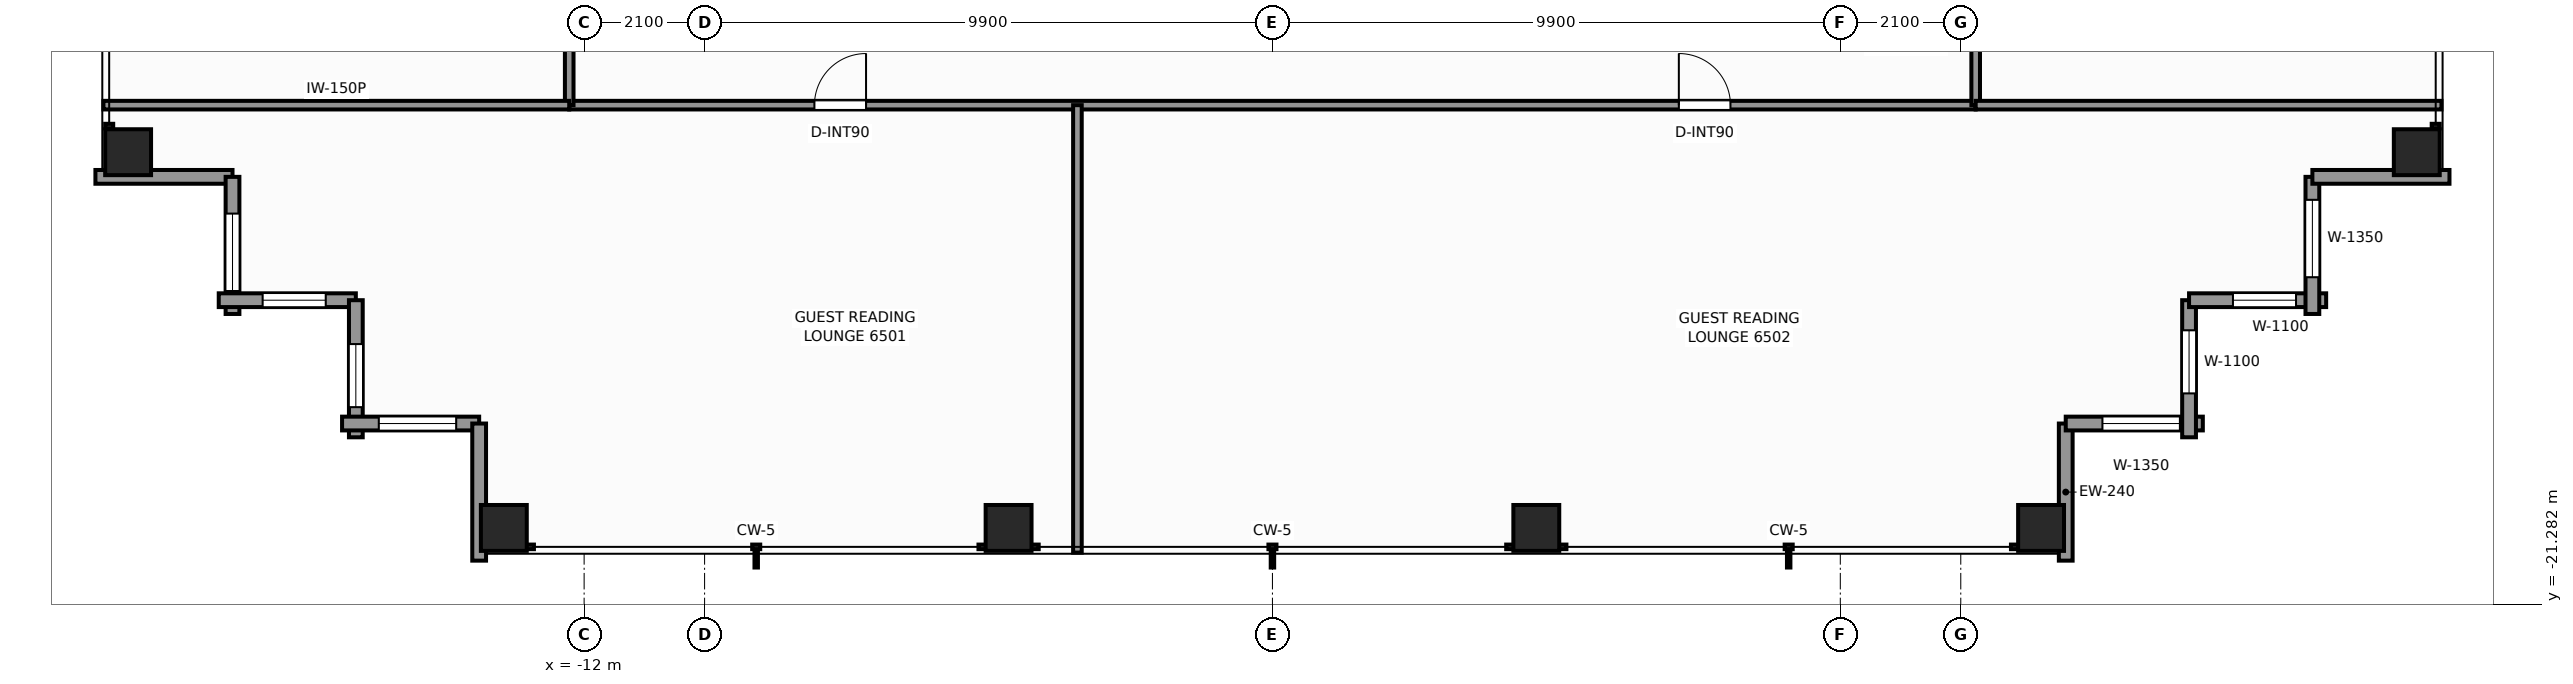
"""IFC4 building model, lengths in metres.
Left out: names, types, materials, properties, quantities, classifications, styles, units other than length and angle.
Written with IfcOpenShell. Run it as: python <this file> out.ifc"""

import sys

from ifc_helpers import new_model, si_unit, direction, frame, frame_2d, origin, origin_2d, place, context, subcontext, project, spatial, rectangle, extrude, element, fill, save


model = new_model("IFC4")
c1 = context("Model", 3, precision=1e-05, world=origin(), true_north=direction((0.0, 1.0)))
c2 = subcontext(c1, "Body", "Model", "MODEL_VIEW")
j1 = project(units=[si_unit("LENGTHUNIT", "METRE"), si_unit("PLANEANGLEUNIT", "RADIAN")], contexts=[c1])
p1 = place(None, origin())
s1 = spatial("IfcSite", under=j1, at=p1, CompositionType="ELEMENT")
p2 = place(p1, origin())
s2 = spatial("IfcBuilding", under=s1, at=p2, CompositionType="ELEMENT")
p3 = place(p2, frame((0.0, 0.0, 222.9)))
s3 = spatial("IfcBuildingStorey", under=s2, at=p3, CompositionType="ELEMENT", Elevation=222.9)
for number, where, z_axis, x_axis in (
    (1, (-13.4, -19.95, 0.0), (0.0, 0.0, 1.0), (1.0, 0.0, 0.0)),
    (2, (-4.6, -19.95, 0.0), (0.0, 0.0, 1.0), (1.0, 0.0, 0.0)),
    (3, (4.6, -19.95, 0.0), (0.0, 0.0, 1.0), (1.0, 0.0, 0.0)),
    (4, (13.4, -19.95, 0.0), (0.0, 0.0, 1.0), (1.0, 0.0, 0.0)),
    (5, (-19.95, -13.4, 0.0), (0.0, 0.0, 1.0), (1.0, 0.0, 0.0)),
    (6, (19.95, -13.4, 0.0), (0.0, 0.0, 1.0), (1.0, 0.0, 0.0)),
):
    element("IfcColumn", number, at=place(p3, frame(where, z_axis=z_axis, x_axis=x_axis)), inside=s3, PredefinedType="COLUMN", context=c2, shape_type="SweptSolid", body=[
        extrude(rectangle(XDim=0.8, YDim=0.8, at=origin_2d()), origin(), (0.0, 0.0, 1.0), 3.3),
    ])
p4 = place(p3, frame((13.83, -18.13, 0.0), z_axis=(0.0, 0.0, 1.0), x_axis=(0.0, -1.0, 0.0)))
e7 = element("IfcWall", 7, at=p4, inside=s3, PredefinedType="STANDARD", context=c2, shape_type="SweptSolid", body=[
    extrude(rectangle(XDim=2.39, YDim=0.24, at=frame_2d((1.195, 0.0))), origin(), (0.0, 0.0, 1.0), 2.463),
])
p5 = place(p3, frame((16.22, -18.13, 0.0), z_axis=(0.0, 0.0, 1.0), x_axis=(-1.0, 0.0, 0.0)))
e8 = element("IfcWall", 8, at=p5, inside=s3, PredefinedType="STANDARD", context=c2, shape_type="SweptSolid", body=[
    extrude(rectangle(XDim=2.39, YDim=0.24, at=frame_2d((1.195, 0.0))), origin(), (0.0, 0.0, 1.0), 2.463),
])
p6 = place(p5, frame((0.4, 0.0, 0.65)))
e9 = element("IfcOpeningElement", 9, at=p6, cuts=e8, PredefinedType="OPENING", context=c2, shape_type="SweptSolid", body=[
    extrude(rectangle(XDim=1.35, YDim=1.55, at=frame_2d((0.675, 0.775))), frame((0.0, 0.13, 0.0), z_axis=(0.0, -1.0, 0.0), x_axis=(1.0, 0.0, 0.0)), (0.0, 0.0, 1.0), 0.26),
])
p7 = place(p3, frame((15.98, -15.98, 0.0), z_axis=(0.0, 0.0, 1.0), x_axis=(0.0, -1.0, 0.0)))
e10 = element("IfcWall", 10, at=p7, inside=s3, PredefinedType="STANDARD", context=c2, shape_type="SweptSolid", body=[
    extrude(rectangle(XDim=2.39, YDim=0.24, at=frame_2d((1.195, 0.0))), origin(), (0.0, 0.0, 1.0), 2.463),
])
p8 = place(p7, frame((0.525, 0.0, 0.65)))
e11 = element("IfcOpeningElement", 11, at=p8, cuts=e10, PredefinedType="OPENING", context=c2, shape_type="SweptSolid", body=[
    extrude(rectangle(XDim=1.1, YDim=1.45, at=frame_2d((0.55, 0.725))), frame((0.0, 0.13, 0.0), z_axis=(0.0, -1.0, 0.0), x_axis=(1.0, 0.0, 0.0)), (0.0, 0.0, 1.0), 0.26),
])
p9 = place(p3, frame((18.37, -15.98, 0.0), z_axis=(0.0, 0.0, 1.0), x_axis=(-1.0, 0.0, 0.0)))
e12 = element("IfcWall", 12, at=p9, inside=s3, PredefinedType="STANDARD", context=c2, shape_type="SweptSolid", body=[
    extrude(rectangle(XDim=2.39, YDim=0.24, at=frame_2d((1.195, 0.0))), origin(), (0.0, 0.0, 1.0), 2.463),
])
p10 = place(p9, frame((0.525, 0.0, 0.65)))
e13 = element("IfcOpeningElement", 13, at=p10, cuts=e12, PredefinedType="OPENING", context=c2, shape_type="SweptSolid", body=[
    extrude(rectangle(XDim=1.1, YDim=1.45, at=frame_2d((0.55, 0.725))), frame((0.0, 0.13, 0.0), z_axis=(0.0, -1.0, 0.0), x_axis=(1.0, 0.0, 0.0)), (0.0, 0.0, 1.0), 0.26),
])
p11 = place(p3, frame((18.13, -13.83, 0.0), z_axis=(0.0, 0.0, 1.0), x_axis=(0.0, -1.0, 0.0)))
e14 = element("IfcWall", 14, at=p11, inside=s3, PredefinedType="STANDARD", context=c2, shape_type="SweptSolid", body=[
    extrude(rectangle(XDim=2.39, YDim=0.24, at=frame_2d((1.195, 0.0))), origin(), (0.0, 0.0, 1.0), 2.463),
])
p12 = place(p11, frame((0.4, 0.0, 0.65)))
e15 = element("IfcOpeningElement", 15, at=p12, cuts=e14, PredefinedType="OPENING", context=c2, shape_type="SweptSolid", body=[
    extrude(rectangle(XDim=1.35, YDim=1.55, at=frame_2d((0.675, 0.775))), frame((0.0, 0.13, 0.0), z_axis=(0.0, -1.0, 0.0), x_axis=(1.0, 0.0, 0.0)), (0.0, 0.0, 1.0), 0.26),
])
for number, where, z_axis, x_axis in (
    (16, (20.52, -13.83, 0.0), (0.0, 0.0, 1.0), (-1.0, 0.0, 0.0)),
    (17, (-18.13, -13.83, 0.0), (0.0, 0.0, 1.0), (-1.0, 0.0, 0.0)),
):
    element("IfcWall", number, at=place(p3, frame(where, z_axis=z_axis, x_axis=x_axis)), inside=s3, PredefinedType="STANDARD", context=c2, shape_type="SweptSolid", body=[
        extrude(rectangle(XDim=2.39, YDim=0.24, at=frame_2d((1.195, 0.0))), origin(), (0.0, 0.0, 1.0), 2.463),
    ])
p13 = place(p3, frame((-18.13, -16.22, 0.0), z_axis=(0.0, 0.0, 1.0), x_axis=(0.0, 1.0, 0.0)))
e18 = element("IfcWall", 18, at=p13, inside=s3, PredefinedType="STANDARD", context=c2, shape_type="SweptSolid", body=[
    extrude(rectangle(XDim=2.39, YDim=0.24, at=frame_2d((1.195, 0.0))), origin(), (0.0, 0.0, 1.0), 2.463),
])
p14 = place(p13, frame((0.4, 0.0, 0.65)))
e19 = element("IfcOpeningElement", 19, at=p14, cuts=e18, PredefinedType="OPENING", context=c2, shape_type="SweptSolid", body=[
    extrude(rectangle(XDim=1.35, YDim=1.55, at=frame_2d((0.675, 0.775))), frame((0.0, 0.13, 0.0), z_axis=(0.0, -1.0, 0.0), x_axis=(1.0, 0.0, 0.0)), (0.0, 0.0, 1.0), 0.26),
])
p15 = place(p3, frame((-15.98, -15.98, 0.0), z_axis=(0.0, 0.0, 1.0), x_axis=(-1.0, 0.0, 0.0)))
e20 = element("IfcWall", 20, at=p15, inside=s3, PredefinedType="STANDARD", context=c2, shape_type="SweptSolid", body=[
    extrude(rectangle(XDim=2.39, YDim=0.24, at=frame_2d((1.195, 0.0))), origin(), (0.0, 0.0, 1.0), 2.463),
])
p16 = place(p15, frame((0.525, 0.0, 0.65)))
e21 = element("IfcOpeningElement", 21, at=p16, cuts=e20, PredefinedType="OPENING", context=c2, shape_type="SweptSolid", body=[
    extrude(rectangle(XDim=1.1, YDim=1.45, at=frame_2d((0.55, 0.725))), frame((0.0, 0.13, 0.0), z_axis=(0.0, -1.0, 0.0), x_axis=(1.0, 0.0, 0.0)), (0.0, 0.0, 1.0), 0.26),
])
p17 = place(p3, frame((-15.98, -18.37, 0.0), z_axis=(0.0, 0.0, 1.0), x_axis=(0.0, 1.0, 0.0)))
e22 = element("IfcWall", 22, at=p17, inside=s3, PredefinedType="STANDARD", context=c2, shape_type="SweptSolid", body=[
    extrude(rectangle(XDim=2.39, YDim=0.24, at=frame_2d((1.195, 0.0))), origin(), (0.0, 0.0, 1.0), 2.463),
])
p18 = place(p17, frame((0.525, 0.0, 0.65)))
e23 = element("IfcOpeningElement", 23, at=p18, cuts=e22, PredefinedType="OPENING", context=c2, shape_type="SweptSolid", body=[
    extrude(rectangle(XDim=1.1, YDim=1.45, at=frame_2d((0.55, 0.725))), frame((0.0, 0.13, 0.0), z_axis=(0.0, -1.0, 0.0), x_axis=(1.0, 0.0, 0.0)), (0.0, 0.0, 1.0), 0.26),
])
p19 = place(p3, frame((-13.83, -18.13, 0.0), z_axis=(0.0, 0.0, 1.0), x_axis=(-1.0, 0.0, 0.0)))
e24 = element("IfcWall", 24, at=p19, inside=s3, PredefinedType="STANDARD", context=c2, shape_type="SweptSolid", body=[
    extrude(rectangle(XDim=2.39, YDim=0.24, at=frame_2d((1.195, 0.0))), origin(), (0.0, 0.0, 1.0), 2.463),
])
p20 = place(p19, frame((0.4, 0.0, 0.65)))
e25 = element("IfcOpeningElement", 25, at=p20, cuts=e24, PredefinedType="OPENING", context=c2, shape_type="SweptSolid", body=[
    extrude(rectangle(XDim=1.35, YDim=1.55, at=frame_2d((0.675, 0.775))), frame((0.0, 0.13, 0.0), z_axis=(0.0, -1.0, 0.0), x_axis=(1.0, 0.0, 0.0)), (0.0, 0.0, 1.0), 0.26),
])
p21 = place(p3, frame((-13.83, -20.52, 0.0), z_axis=(0.0, 0.0, 1.0), x_axis=(0.0, 1.0, 0.0)))
e26 = element("IfcWall", 26, at=p21, inside=s3, PredefinedType="STANDARD", context=c2, shape_type="SweptSolid", body=[
    extrude(rectangle(XDim=2.39, YDim=0.24, at=frame_2d((1.195, 0.0))), origin(), (0.0, 0.0, 1.0), 2.463),
])
p22 = place(p3, frame((-12.26, -12.58, 0.0), z_axis=(0.0, 0.0, 1.0), x_axis=(1.0, 0.0, 0.0)))
e27 = element("IfcWall", 27, at=p22, inside=s3, PredefinedType="PARTITIONING", context=c2, shape_type="SweptSolid", body=[
    extrude(rectangle(XDim=24.52, YDim=0.15, at=frame_2d((12.26, 0.0))), origin(), (0.0, 0.0, 1.0), 2.369),
])
p23 = place(p22, frame((4.275, 0.0, 0.0)))
e28 = element("IfcOpeningElement", 28, at=p23, cuts=e27, PredefinedType="OPENING", context=c2, shape_type="SweptSolid", body=[
    extrude(rectangle(XDim=0.9, YDim=2.06, at=frame_2d((0.45, 1.03))), frame((0.0, 0.085, 0.0), z_axis=(0.0, -1.0, 0.0), x_axis=(1.0, 0.0, 0.0)), (0.0, 0.0, 1.0), 0.17),
])
p24 = place(p22, frame((19.345, 0.0, 0.0)))
e29 = element("IfcOpeningElement", 29, at=p24, cuts=e27, PredefinedType="OPENING", context=c2, shape_type="SweptSolid", body=[
    extrude(rectangle(XDim=0.9, YDim=2.06, at=frame_2d((0.45, 1.03))), frame((0.0, 0.085, 0.0), z_axis=(0.0, -1.0, 0.0), x_axis=(1.0, 0.0, 0.0)), (0.0, 0.0, 1.0), 0.17),
])
p25 = place(p3, frame((-12.26, -12.58, 0.0), z_axis=(0.0, 0.0, 1.0), x_axis=(0.0, 1.0, 0.0)))
e30 = element("IfcWall", 30, at=p25, inside=s3, PredefinedType="PARTITIONING", context=c2, shape_type="SweptSolid", body=[
    extrude(rectangle(XDim=24.84, YDim=0.15, at=frame_2d((12.42, 0.0))), origin(), (0.0, 0.0, 1.0), 2.369),
])
p26 = place(p25, frame((3.622, 0.0, 0.0)))
e31 = element("IfcOpeningElement", 31, at=p26, cuts=e30, PredefinedType="OPENING", context=c2, shape_type="SweptSolid", body=[
    extrude(rectangle(XDim=0.9, YDim=2.06, at=frame_2d((0.45, 1.03))), frame((0.0, 0.085, 0.0), z_axis=(0.0, -1.0, 0.0), x_axis=(1.0, 0.0, 0.0)), (0.0, 0.0, 1.0), 0.17),
])
p27 = place(p25, frame((5.698, 0.0, 0.0)))
e32 = element("IfcOpeningElement", 32, at=p27, cuts=e30, PredefinedType="OPENING", context=c2, shape_type="SweptSolid", body=[
    extrude(rectangle(XDim=0.9, YDim=2.06, at=frame_2d((0.45, 1.03))), frame((0.0, 0.085, 0.0), z_axis=(0.0, -1.0, 0.0), x_axis=(1.0, 0.0, 0.0)), (0.0, 0.0, 1.0), 0.17),
])
p28 = place(p25, frame((14.16, 0.0, 0.0)))
e33 = element("IfcOpeningElement", 33, at=p28, cuts=e30, PredefinedType="OPENING", context=c2, shape_type="SweptSolid", body=[
    extrude(rectangle(XDim=0.9, YDim=2.06, at=frame_2d((0.45, 1.03))), frame((0.0, 0.085, 0.0), z_axis=(0.0, -1.0, 0.0), x_axis=(1.0, 0.0, 0.0)), (0.0, 0.0, 1.0), 0.17),
])
p29 = place(p25, frame((21.137, 0.0, 0.0)))
e34 = element("IfcOpeningElement", 34, at=p29, cuts=e30, PredefinedType="OPENING", context=c2, shape_type="SweptSolid", body=[
    extrude(rectangle(XDim=0.95, YDim=2.06, at=frame_2d((0.475, 1.03))), frame((0.0, 0.085, 0.0), z_axis=(0.0, -1.0, 0.0), x_axis=(1.0, 0.0, 0.0)), (0.0, 0.0, 1.0), 0.17),
])
p30 = place(p3, frame((12.26, -12.58, 0.0), z_axis=(0.0, 0.0, 1.0), x_axis=(0.0, 1.0, 0.0)))
e35 = element("IfcWall", 35, at=p30, inside=s3, PredefinedType="PARTITIONING", context=c2, shape_type="SweptSolid", body=[
    extrude(rectangle(XDim=24.84, YDim=0.15, at=frame_2d((12.42, 0.0))), origin(), (0.0, 0.0, 1.0), 2.369),
])
p31 = place(p30, frame((4.595, 0.0, 0.0)))
e36 = element("IfcOpeningElement", 36, at=p31, cuts=e35, PredefinedType="OPENING", context=c2, shape_type="SweptSolid", body=[
    extrude(rectangle(XDim=0.9, YDim=2.06, at=frame_2d((0.45, 1.03))), frame((0.0, 0.085, 0.0), z_axis=(0.0, -1.0, 0.0), x_axis=(1.0, 0.0, 0.0)), (0.0, 0.0, 1.0), 0.17),
])
p32 = place(p30, frame((19.665, 0.0, 0.0)))
e37 = element("IfcOpeningElement", 37, at=p32, cuts=e35, PredefinedType="OPENING", context=c2, shape_type="SweptSolid", body=[
    extrude(rectangle(XDim=0.9, YDim=2.06, at=frame_2d((0.45, 1.03))), frame((0.0, 0.085, 0.0), z_axis=(0.0, -1.0, 0.0), x_axis=(1.0, 0.0, 0.0)), (0.0, 0.0, 1.0), 0.17),
])
for number, where, z_axis, x_axis in (
    (38, (-20.38, -12.58, 0.0), (0.0, 0.0, 1.0), (1.0, 0.0, 0.0)),
    (39, (12.26, -12.58, 0.0), (0.0, 0.0, 1.0), (1.0, 0.0, 0.0)),
):
    element("IfcWall", number, at=place(p3, frame(where, z_axis=z_axis, x_axis=x_axis)), inside=s3, PredefinedType="PARTITIONING", context=c2, shape_type="SweptSolid", body=[
        extrude(rectangle(XDim=8.12, YDim=0.15, at=frame_2d((4.06, 0.0))), origin(), (0.0, 0.0, 1.0), 2.369),
    ])
p33 = place(p3, frame((-3.4, -20.38, 0.0), z_axis=(0.0, 0.0, 1.0), x_axis=(0.0, 1.0, 0.0)))
e40 = element("IfcWall", 40, at=p33, inside=s3, PredefinedType="PARTITIONING", context=c2, shape_type="SweptSolid", body=[
    extrude(rectangle(XDim=7.8, YDim=0.15, at=frame_2d((3.9, 0.0))), origin(), (0.0, 0.0, 1.0), 2.453),
])
p34 = place(p6, origin())
e41 = element("IfcWindow", 41, at=p34, inside=s3, PartitioningType="SINGLE_PANEL", PredefinedType="WINDOW", context=c2, shape_type="SweptSolid", body=[
    extrude(rectangle(XDim=1.35, YDim=1.55, at=frame_2d((0.675, 0.775))), frame((0.0, 0.03, 0.0), z_axis=(0.0, -1.0, 0.0), x_axis=(1.0, 0.0, 0.0)), (0.0, 0.0, 1.0), 0.06),
])
fill(e9, e41)
p35 = place(p8, origin())
e42 = element("IfcWindow", 42, at=p35, inside=s3, PartitioningType="SINGLE_PANEL", PredefinedType="WINDOW", context=c2, shape_type="SweptSolid", body=[
    extrude(rectangle(XDim=1.1, YDim=1.45, at=frame_2d((0.55, 0.725))), frame((0.0, 0.03, 0.0), z_axis=(0.0, -1.0, 0.0), x_axis=(1.0, 0.0, 0.0)), (0.0, 0.0, 1.0), 0.06),
])
fill(e11, e42)
p36 = place(p10, origin())
e43 = element("IfcWindow", 43, at=p36, inside=s3, PartitioningType="SINGLE_PANEL", PredefinedType="WINDOW", context=c2, shape_type="SweptSolid", body=[
    extrude(rectangle(XDim=1.1, YDim=1.45, at=frame_2d((0.55, 0.725))), frame((0.0, 0.03, 0.0), z_axis=(0.0, -1.0, 0.0), x_axis=(1.0, 0.0, 0.0)), (0.0, 0.0, 1.0), 0.06),
])
fill(e13, e43)
p37 = place(p12, origin())
e44 = element("IfcWindow", 44, at=p37, inside=s3, PartitioningType="SINGLE_PANEL", PredefinedType="WINDOW", context=c2, shape_type="SweptSolid", body=[
    extrude(rectangle(XDim=1.35, YDim=1.55, at=frame_2d((0.675, 0.775))), frame((0.0, 0.03, 0.0), z_axis=(0.0, -1.0, 0.0), x_axis=(1.0, 0.0, 0.0)), (0.0, 0.0, 1.0), 0.06),
])
fill(e15, e44)
p38 = place(p14, origin())
e45 = element("IfcWindow", 45, at=p38, inside=s3, PartitioningType="SINGLE_PANEL", PredefinedType="WINDOW", context=c2, shape_type="SweptSolid", body=[
    extrude(rectangle(XDim=1.35, YDim=1.55, at=frame_2d((0.675, 0.775))), frame((0.0, 0.03, 0.0), z_axis=(0.0, -1.0, 0.0), x_axis=(1.0, 0.0, 0.0)), (0.0, 0.0, 1.0), 0.06),
])
fill(e19, e45)
p39 = place(p16, origin())
e46 = element("IfcWindow", 46, at=p39, inside=s3, PartitioningType="SINGLE_PANEL", PredefinedType="WINDOW", context=c2, shape_type="SweptSolid", body=[
    extrude(rectangle(XDim=1.1, YDim=1.45, at=frame_2d((0.55, 0.725))), frame((0.0, 0.03, 0.0), z_axis=(0.0, -1.0, 0.0), x_axis=(1.0, 0.0, 0.0)), (0.0, 0.0, 1.0), 0.06),
])
fill(e21, e46)
p40 = place(p18, origin())
e47 = element("IfcWindow", 47, at=p40, inside=s3, PartitioningType="SINGLE_PANEL", PredefinedType="WINDOW", context=c2, shape_type="SweptSolid", body=[
    extrude(rectangle(XDim=1.1, YDim=1.45, at=frame_2d((0.55, 0.725))), frame((0.0, 0.03, 0.0), z_axis=(0.0, -1.0, 0.0), x_axis=(1.0, 0.0, 0.0)), (0.0, 0.0, 1.0), 0.06),
])
fill(e23, e47)
p41 = place(p20, origin())
e48 = element("IfcWindow", 48, at=p41, inside=s3, PartitioningType="SINGLE_PANEL", PredefinedType="WINDOW", context=c2, shape_type="SweptSolid", body=[
    extrude(rectangle(XDim=1.35, YDim=1.55, at=frame_2d((0.675, 0.775))), frame((0.0, 0.03, 0.0), z_axis=(0.0, -1.0, 0.0), x_axis=(1.0, 0.0, 0.0)), (0.0, 0.0, 1.0), 0.06),
])
fill(e25, e48)
p42 = place(p23, origin())
e49 = element("IfcDoor", 49, at=p42, inside=s3, OperationType="SINGLE_SWING_RIGHT", PredefinedType="DOOR", context=c2, shape_type="SweptSolid", body=[
    extrude(rectangle(XDim=0.9, YDim=2.06, at=frame_2d((0.45, 1.03))), frame((0.0, 0.025, 0.0), z_axis=(0.0, -1.0, 0.0), x_axis=(1.0, 0.0, 0.0)), (0.0, 0.0, 1.0), 0.05),
])
fill(e28, e49)
p43 = place(p24, origin())
e50 = element("IfcDoor", 50, at=p43, inside=s3, OperationType="SINGLE_SWING_LEFT", PredefinedType="DOOR", context=c2, shape_type="SweptSolid", body=[
    extrude(rectangle(XDim=0.9, YDim=2.06, at=frame_2d((0.45, 1.03))), frame((0.0, 0.025, 0.0), z_axis=(0.0, -1.0, 0.0), x_axis=(1.0, 0.0, 0.0)), (0.0, 0.0, 1.0), 0.05),
])
fill(e29, e50)
save(model, sys.argv[1])
